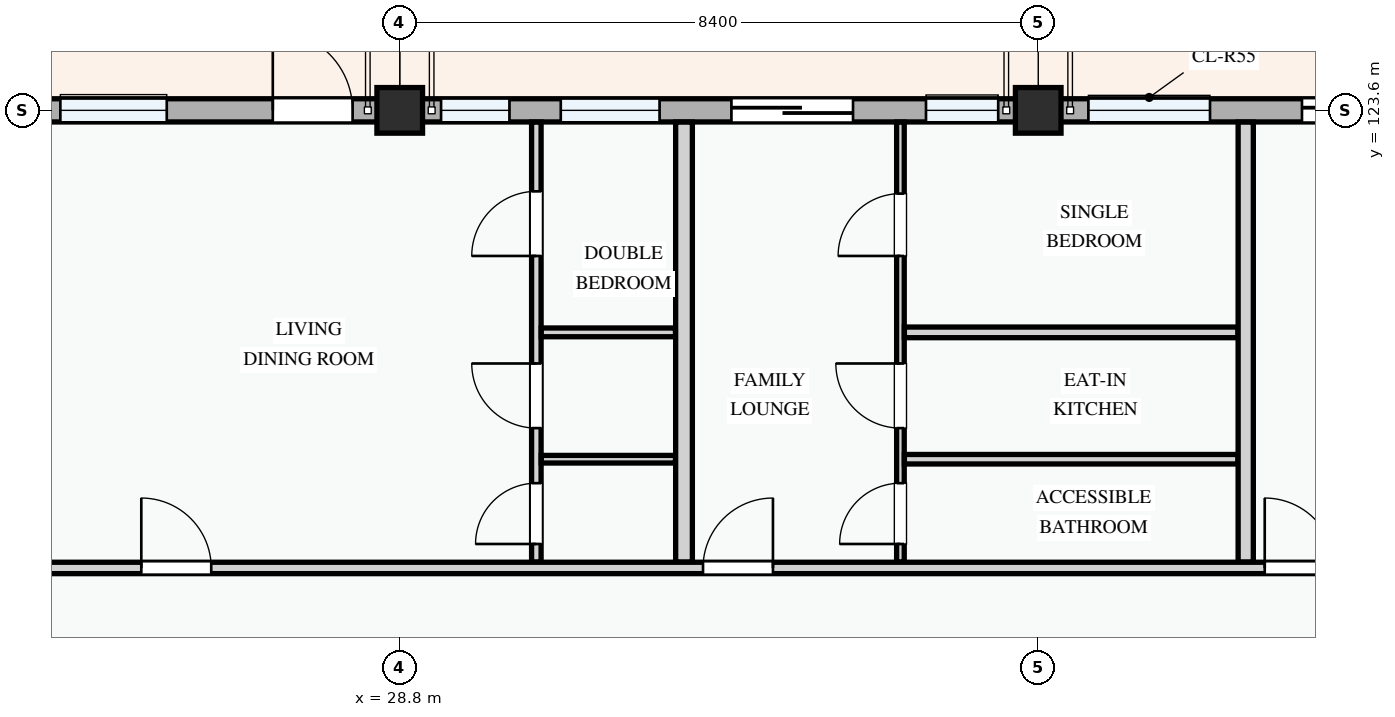
"""IFC4 building model, lengths in metres.
Left out: names, types, materials, properties, quantities, classifications, styles, units other than length and angle.
Written with IfcOpenShell. Run it as: python <this file> out.ifc"""

import sys

from ifc_helpers import new_model, si_unit, direction, frame, frame_2d, origin, origin_2d, place, context, subcontext, project, spatial, rectangle, extrude, element, fill, save


model = new_model("IFC4")
c1 = context("Model", 3, precision=1e-05, world=origin(), true_north=direction((0.0, 1.0)))
c2 = subcontext(c1, "Body", "Model", "MODEL_VIEW")
j1 = project(units=[si_unit("LENGTHUNIT", "METRE"), si_unit("PLANEANGLEUNIT", "RADIAN")], contexts=[c1])
p1 = place(None, origin())
s1 = spatial("IfcSite", under=j1, at=p1, CompositionType="ELEMENT")
p2 = place(p1, origin())
s2 = spatial("IfcBuilding", under=s1, at=p2, CompositionType="ELEMENT")
p3 = place(p2, frame((0.0, 0.0, 24.6)))
s3 = spatial("IfcBuildingStorey", under=s2, at=p3, CompositionType="ELEMENT", Elevation=24.6)
for number, where, z_axis, x_axis in (
    (1, (28.8, 123.6, 0.0), (0.0, 0.0, 1.0), (1.0, 0.0, 0.0)),
    (2, (37.2, 123.6, 0.0), (0.0, 0.0, 1.0), (1.0, 0.0, 0.0)),
):
    element("IfcColumn", number, at=place(p3, frame(where, z_axis=z_axis, x_axis=x_axis)), inside=s3, PredefinedType="COLUMN", context=c2, shape_type="SweptSolid", body=[
        extrude(rectangle(XDim=0.6, YDim=0.6, at=origin_2d()), origin(), (0.0, 0.0, 1.0), 3.3),
    ])
p4 = place(p3, frame((43.2, 123.6, 0.0), z_axis=(0.0, 0.0, 1.0), x_axis=(-1.0, 0.0, 0.0)))
e3 = element("IfcWall", 3, at=p4, inside=s3, PredefinedType="STANDARD", context=c2, shape_type="SweptSolid", body=[
    extrude(rectangle(XDim=6.0, YDim=0.305, at=frame_2d((3.0, 0.0))), origin(), (0.0, 0.0, 1.0), 2.475),
])
p5 = place(p4, frame((1.03, 0.0, 0.0)))
e4 = element("IfcOpeningElement", 4, at=p5, cuts=e3, PredefinedType="OPENING", context=c2, shape_type="SweptSolid", body=[
    extrude(rectangle(XDim=1.5, YDim=2.2, at=frame_2d((0.75, 1.1))), frame((0.0, 0.163, 0.0), z_axis=(0.0, -1.0, 0.0), x_axis=(1.0, 0.0, 0.0)), (0.0, 0.0, 1.0), 0.325),
])
p6 = place(p4, frame((3.74, 0.0, 0.78)))
e5 = element("IfcOpeningElement", 5, at=p6, cuts=e3, PredefinedType="OPENING", context=c2, shape_type="SweptSolid", body=[
    extrude(rectangle(XDim=1.6, YDim=1.55, at=frame_2d((0.8, 0.775))), frame((0.0, 0.163, 0.0), z_axis=(0.0, -1.0, 0.0), x_axis=(1.0, 0.0, 0.0)), (0.0, 0.0, 1.0), 0.325),
])
p7 = place(p3, frame((37.2, 123.6, 0.0), z_axis=(0.0, 0.0, 1.0), x_axis=(-1.0, 0.0, 0.0)))
e6 = element("IfcWall", 6, at=p7, inside=s3, PredefinedType="STANDARD", context=c2, shape_type="SweptSolid", body=[
    extrude(rectangle(XDim=8.4, YDim=0.305, at=frame_2d((4.2, 0.0))), origin(), (0.0, 0.0, 1.0), 2.375),
])
p8 = place(p7, frame((2.436, 0.0, 0.0)))
e7 = element("IfcOpeningElement", 7, at=p8, cuts=e6, PredefinedType="OPENING", context=c2, shape_type="SweptSolid", body=[
    extrude(rectangle(XDim=1.6, YDim=2.2, at=frame_2d((0.8, 1.1))), frame((0.0, 0.163, 0.0), z_axis=(0.0, -1.0, 0.0), x_axis=(1.0, 0.0, 0.0)), (0.0, 0.0, 1.0), 0.325),
])
p9 = place(p7, frame((0.526, 0.0, 0.78)))
e8 = element("IfcOpeningElement", 8, at=p9, cuts=e6, PredefinedType="OPENING", context=c2, shape_type="SweptSolid", body=[
    extrude(rectangle(XDim=0.95, YDim=1.15, at=frame_2d((0.475, 0.575))), frame((0.0, 0.163, 0.0), z_axis=(0.0, -1.0, 0.0), x_axis=(1.0, 0.0, 0.0)), (0.0, 0.0, 1.0), 0.325),
])
p10 = place(p7, frame((4.981, 0.0, 0.78)))
e9 = element("IfcOpeningElement", 9, at=p10, cuts=e6, PredefinedType="OPENING", context=c2, shape_type="SweptSolid", body=[
    extrude(rectangle(XDim=1.3, YDim=1.4, at=frame_2d((0.65, 0.7))), frame((0.0, 0.163, 0.0), z_axis=(0.0, -1.0, 0.0), x_axis=(1.0, 0.0, 0.0)), (0.0, 0.0, 1.0), 0.325),
])
p11 = place(p7, frame((6.956, 0.0, 0.78)))
e10 = element("IfcOpeningElement", 10, at=p11, cuts=e6, PredefinedType="OPENING", context=c2, shape_type="SweptSolid", body=[
    extrude(rectangle(XDim=0.9, YDim=1.2, at=frame_2d((0.45, 0.6))), frame((0.0, 0.163, 0.0), z_axis=(0.0, -1.0, 0.0), x_axis=(1.0, 0.0, 0.0)), (0.0, 0.0, 1.0), 0.325),
])
p12 = place(p3, frame((28.8, 123.6, 0.0), z_axis=(0.0, 0.0, 1.0), x_axis=(-1.0, 0.0, 0.0)))
e11 = element("IfcWall", 11, at=p12, inside=s3, PredefinedType="STANDARD", context=c2, shape_type="SweptSolid", body=[
    extrude(rectangle(XDim=6.0, YDim=0.305, at=frame_2d((3.0, 0.0))), origin(), (0.0, 0.0, 1.0), 2.475),
])
p13 = place(p12, frame((0.62, 0.0, 0.0)))
e12 = element("IfcOpeningElement", 12, at=p13, cuts=e11, PredefinedType="OPENING", context=c2, shape_type="SweptSolid", body=[
    extrude(rectangle(XDim=1.05, YDim=2.15, at=frame_2d((0.525, 1.075))), frame((0.0, 0.163, 0.0), z_axis=(0.0, -1.0, 0.0), x_axis=(1.0, 0.0, 0.0)), (0.0, 0.0, 1.0), 0.325),
])
p14 = place(p12, frame((3.065, 0.0, 0.78)))
e13 = element("IfcOpeningElement", 13, at=p14, cuts=e11, PredefinedType="OPENING", context=c2, shape_type="SweptSolid", body=[
    extrude(rectangle(XDim=1.4, YDim=1.45, at=frame_2d((0.7, 0.725))), frame((0.0, 0.163, 0.0), z_axis=(0.0, -1.0, 0.0), x_axis=(1.0, 0.0, 0.0)), (0.0, 0.0, 1.0), 0.325),
])
p15 = place(p3, frame((30.597, 117.657, 0.0), z_axis=(0.0, 0.0, 1.0), x_axis=(0.0, 1.0, 0.0)))
e14 = element("IfcWall", 14, at=p15, inside=s3, PredefinedType="PARTITIONING", context=c2, shape_type="SweptSolid", body=[
    extrude(rectangle(XDim=5.789, YDim=0.125, at=frame_2d((2.894, 0.0))), origin(), (0.0, 0.0, 1.0), 3.0),
])
p16 = place(p15, frame((0.238, 0.0, 0.0)))
e15 = element("IfcOpeningElement", 15, at=p16, cuts=e14, PredefinedType="OPENING", context=c2, shape_type="SweptSolid", body=[
    extrude(rectangle(XDim=0.8, YDim=2.1, at=frame_2d((0.4, 1.05))), frame((0.0, 0.073, 0.0), z_axis=(0.0, -1.0, 0.0), x_axis=(1.0, 0.0, 0.0)), (0.0, 0.0, 1.0), 0.145),
])
p17 = place(p15, frame((1.763, 0.0, 0.0)))
e16 = element("IfcOpeningElement", 16, at=p17, cuts=e14, PredefinedType="OPENING", context=c2, shape_type="SweptSolid", body=[
    extrude(rectangle(XDim=0.85, YDim=2.1, at=frame_2d((0.425, 1.05))), frame((0.0, 0.073, 0.0), z_axis=(0.0, -1.0, 0.0), x_axis=(1.0, 0.0, 0.0)), (0.0, 0.0, 1.0), 0.145),
])
p18 = place(p15, frame((4.028, 0.0, 0.0)))
e17 = element("IfcOpeningElement", 17, at=p18, cuts=e14, PredefinedType="OPENING", context=c2, shape_type="SweptSolid", body=[
    extrude(rectangle(XDim=0.85, YDim=2.1, at=frame_2d((0.425, 1.05))), frame((0.0, 0.073, 0.0), z_axis=(0.0, -1.0, 0.0), x_axis=(1.0, 0.0, 0.0)), (0.0, 0.0, 1.0), 0.145),
])
p19 = place(p3, frame((30.662, 120.679, 0.0), z_axis=(0.0, 0.0, 1.0), x_axis=(1.0, 0.0, 0.0)))
e18 = element("IfcWall", 18, at=p19, inside=s3, PredefinedType="PARTITIONING", context=c2, shape_type="SweptSolid", body=[
    extrude(rectangle(XDim=1.766, YDim=0.115, at=frame_2d((0.883, 0.0))), origin(), (0.0, 0.0, 1.0), 3.0),
])
p20 = place(p3, frame((30.662, 119.01, 0.0), z_axis=(0.0, 0.0, 1.0), x_axis=(1.0, 0.0, 0.0)))
e19 = element("IfcWall", 19, at=p20, inside=s3, PredefinedType="PARTITIONING", context=c2, shape_type="SweptSolid", body=[
    extrude(rectangle(XDim=1.766, YDim=0.1, at=frame_2d((0.883, 0.0))), origin(), (0.0, 0.0, 1.0), 3.0),
])
p21 = place(p3, frame((35.387, 117.657, 0.0), z_axis=(0.0, 0.0, 1.0), x_axis=(0.0, 1.0, 0.0)))
e20 = element("IfcWall", 20, at=p21, inside=s3, PredefinedType="PARTITIONING", context=c2, shape_type="SweptSolid", body=[
    extrude(rectangle(XDim=5.789, YDim=0.1, at=frame_2d((2.894, 0.0))), origin(), (0.0, 0.0, 1.0), 3.0),
])
p22 = place(p21, frame((0.238, 0.0, 0.0)))
e21 = element("IfcOpeningElement", 21, at=p22, cuts=e20, PredefinedType="OPENING", context=c2, shape_type="SweptSolid", body=[
    extrude(rectangle(XDim=0.8, YDim=2.1, at=frame_2d((0.4, 1.05))), frame((0.0, 0.06, 0.0), z_axis=(0.0, -1.0, 0.0), x_axis=(1.0, 0.0, 0.0)), (0.0, 0.0, 1.0), 0.12),
])
p23 = place(p21, frame((1.763, 0.0, 0.0)))
e22 = element("IfcOpeningElement", 22, at=p23, cuts=e20, PredefinedType="OPENING", context=c2, shape_type="SweptSolid", body=[
    extrude(rectangle(XDim=0.85, YDim=2.1, at=frame_2d((0.425, 1.05))), frame((0.0, 0.06, 0.0), z_axis=(0.0, -1.0, 0.0), x_axis=(1.0, 0.0, 0.0)), (0.0, 0.0, 1.0), 0.12),
])
p24 = place(p21, frame((4.028, 0.0, 0.0)))
e23 = element("IfcOpeningElement", 23, at=p24, cuts=e20, PredefinedType="OPENING", context=c2, shape_type="SweptSolid", body=[
    extrude(rectangle(XDim=0.82, YDim=2.08, at=frame_2d((0.41, 1.04))), frame((0.0, 0.06, 0.0), z_axis=(0.0, -1.0, 0.0), x_axis=(1.0, 0.0, 0.0)), (0.0, 0.0, 1.0), 0.12),
])
p25 = place(p3, frame((35.439, 120.679, 0.0), z_axis=(0.0, 0.0, 1.0), x_axis=(1.0, 0.0, 0.0)))
e24 = element("IfcWall", 24, at=p25, inside=s3, PredefinedType="PARTITIONING", context=c2, shape_type="SweptSolid", body=[
    extrude(rectangle(XDim=4.389, YDim=0.14, at=frame_2d((2.194, 0.0))), origin(), (0.0, 0.0, 1.0), 3.0),
])
p26 = place(p3, frame((35.439, 119.01, 0.0), z_axis=(0.0, 0.0, 1.0), x_axis=(1.0, 0.0, 0.0)))
e25 = element("IfcWall", 25, at=p26, inside=s3, PredefinedType="PARTITIONING", context=c2, shape_type="SweptSolid", body=[
    extrude(rectangle(XDim=4.389, YDim=0.125, at=frame_2d((2.194, 0.0))), origin(), (0.0, 0.0, 1.0), 3.0),
])
p27 = place(p3, frame((32.54, 117.657, 0.0), z_axis=(0.0, 0.0, 1.0), x_axis=(0.0, 1.0, 0.0)))
e26 = element("IfcWall", 26, at=p27, inside=s3, PredefinedType="PARTITIONING", context=c2, shape_type="SweptSolid", body=[
    extrude(rectangle(XDim=5.789, YDim=0.22, at=frame_2d((2.894, 0.0))), origin(), (0.0, 0.0, 1.0), 3.0),
])
p28 = place(p3, frame((39.93, 117.657, 0.0), z_axis=(0.0, 0.0, 1.0), x_axis=(0.0, 1.0, 0.0)))
e27 = element("IfcWall", 27, at=p28, inside=s3, PredefinedType="PARTITIONING", context=c2, shape_type="SweptSolid", body=[
    extrude(rectangle(XDim=5.789, YDim=0.2, at=frame_2d((2.894, 0.0))), origin(), (0.0, 0.0, 1.0), 3.0),
])
p29 = place(p3, frame((22.66, 117.58, 0.0), z_axis=(0.0, 0.0, 1.0), x_axis=(1.0, 0.0, 0.0)))
e28 = element("IfcWall", 28, at=p29, inside=s3, PredefinedType="PARTITIONING", context=c2, shape_type="SweptSolid", body=[
    extrude(rectangle(XDim=28.88, YDim=0.15, at=frame_2d((14.44, 0.0))), origin(), (0.0, 0.0, 1.0), 3.0),
])
p30 = place(p29, frame((2.74, 0.0, 0.0)))
e29 = element("IfcOpeningElement", 29, at=p30, cuts=e28, PredefinedType="OPENING", context=c2, shape_type="SweptSolid", body=[
    extrude(rectangle(XDim=0.92, YDim=2.1, at=frame_2d((0.46, 1.05))), frame((0.0, 0.085, 0.0), z_axis=(0.0, -1.0, 0.0), x_axis=(1.0, 0.0, 0.0)), (0.0, 0.0, 1.0), 0.17),
])
p31 = place(p29, frame((10.13, 0.0, 0.0)))
e30 = element("IfcOpeningElement", 30, at=p31, cuts=e28, PredefinedType="OPENING", context=c2, shape_type="SweptSolid", body=[
    extrude(rectangle(XDim=0.92, YDim=2.1, at=frame_2d((0.46, 1.05))), frame((0.0, 0.085, 0.0), z_axis=(0.0, -1.0, 0.0), x_axis=(1.0, 0.0, 0.0)), (0.0, 0.0, 1.0), 0.17),
])
p32 = place(p29, frame((17.52, 0.0, 0.0)))
e31 = element("IfcOpeningElement", 31, at=p32, cuts=e28, PredefinedType="OPENING", context=c2, shape_type="SweptSolid", body=[
    extrude(rectangle(XDim=0.92, YDim=2.1, at=frame_2d((0.46, 1.05))), frame((0.0, 0.085, 0.0), z_axis=(0.0, -1.0, 0.0), x_axis=(1.0, 0.0, 0.0)), (0.0, 0.0, 1.0), 0.17),
])
p33 = place(p5, frame((1.5, 0.0, 0.0), z_axis=(0.0, 0.0, 1.0), x_axis=(-1.0, 0.0, 0.0)))
e32 = element("IfcDoor", 32, at=p33, inside=s3, OperationType="SLIDING_TO_RIGHT", PredefinedType="DOOR", context=c2, shape_type="SweptSolid", body=[
    extrude(rectangle(XDim=1.5, YDim=2.2, at=frame_2d((0.75, 1.1))), frame((0.0, 0.025, 0.0), z_axis=(0.0, -1.0, 0.0), x_axis=(1.0, 0.0, 0.0)), (0.0, 0.0, 1.0), 0.05),
])
fill(e4, e32)
p34 = place(p6, origin())
e33 = element("IfcWindow", 33, at=p34, inside=s3, PartitioningType="DOUBLE_PANEL_VERTICAL", PredefinedType="WINDOW", context=c2, shape_type="SweptSolid", body=[
    extrude(rectangle(XDim=1.6, YDim=1.55, at=frame_2d((0.8, 0.775))), frame((0.0, 0.03, 0.0), z_axis=(0.0, -1.0, 0.0), x_axis=(1.0, 0.0, 0.0)), (0.0, 0.0, 1.0), 0.06),
])
fill(e5, e33)
p35 = place(p8, frame((1.6, 0.0, 0.0), z_axis=(0.0, 0.0, 1.0), x_axis=(-1.0, 0.0, 0.0)))
e34 = element("IfcDoor", 34, at=p35, inside=s3, OperationType="SLIDING_TO_LEFT", PredefinedType="DOOR", context=c2, shape_type="SweptSolid", body=[
    extrude(rectangle(XDim=1.6, YDim=2.2, at=frame_2d((0.8, 1.1))), frame((0.0, 0.025, 0.0), z_axis=(0.0, -1.0, 0.0), x_axis=(1.0, 0.0, 0.0)), (0.0, 0.0, 1.0), 0.05),
])
fill(e7, e34)
p36 = place(p9, origin())
e35 = element("IfcWindow", 35, at=p36, inside=s3, PartitioningType="SINGLE_PANEL", PredefinedType="WINDOW", context=c2, shape_type="SweptSolid", body=[
    extrude(rectangle(XDim=0.95, YDim=1.15, at=frame_2d((0.475, 0.575))), frame((0.0, 0.03, 0.0), z_axis=(0.0, -1.0, 0.0), x_axis=(1.0, 0.0, 0.0)), (0.0, 0.0, 1.0), 0.06),
])
fill(e8, e35)
p37 = place(p10, origin())
e36 = element("IfcWindow", 36, at=p37, inside=s3, PartitioningType="SINGLE_PANEL", PredefinedType="WINDOW", context=c2, shape_type="SweptSolid", body=[
    extrude(rectangle(XDim=1.3, YDim=1.4, at=frame_2d((0.65, 0.7))), frame((0.0, 0.03, 0.0), z_axis=(0.0, -1.0, 0.0), x_axis=(1.0, 0.0, 0.0)), (0.0, 0.0, 1.0), 0.06),
])
fill(e9, e36)
p38 = place(p11, origin())
e37 = element("IfcWindow", 37, at=p38, inside=s3, PartitioningType="SINGLE_PANEL", PredefinedType="WINDOW", context=c2, shape_type="SweptSolid", body=[
    extrude(rectangle(XDim=0.9, YDim=1.2, at=frame_2d((0.45, 0.6))), frame((0.0, 0.03, 0.0), z_axis=(0.0, -1.0, 0.0), x_axis=(1.0, 0.0, 0.0)), (0.0, 0.0, 1.0), 0.06),
])
fill(e10, e37)
p39 = place(p13, frame((1.05, 0.0, 0.0), z_axis=(0.0, 0.0, 1.0), x_axis=(-1.0, 0.0, 0.0)))
e38 = element("IfcDoor", 38, at=p39, inside=s3, OperationType="SINGLE_SWING_LEFT", PredefinedType="DOOR", context=c2, shape_type="SweptSolid", body=[
    extrude(rectangle(XDim=1.05, YDim=2.15, at=frame_2d((0.525, 1.075))), frame((0.0, 0.025, 0.0), z_axis=(0.0, -1.0, 0.0), x_axis=(1.0, 0.0, 0.0)), (0.0, 0.0, 1.0), 0.05),
])
fill(e12, e38)
p40 = place(p14, origin())
e39 = element("IfcWindow", 39, at=p40, inside=s3, PartitioningType="SINGLE_PANEL", PredefinedType="WINDOW", context=c2, shape_type="SweptSolid", body=[
    extrude(rectangle(XDim=1.4, YDim=1.45, at=frame_2d((0.7, 0.725))), frame((0.0, 0.03, 0.0), z_axis=(0.0, -1.0, 0.0), x_axis=(1.0, 0.0, 0.0)), (0.0, 0.0, 1.0), 0.06),
])
fill(e13, e39)
p41 = place(p16, origin())
e40 = element("IfcDoor", 40, at=p41, inside=s3, OperationType="SINGLE_SWING_LEFT", PredefinedType="DOOR", context=c2, shape_type="SweptSolid", body=[
    extrude(rectangle(XDim=0.8, YDim=2.1, at=frame_2d((0.4, 1.05))), frame((0.0, 0.025, 0.0), z_axis=(0.0, -1.0, 0.0), x_axis=(1.0, 0.0, 0.0)), (0.0, 0.0, 1.0), 0.05),
])
fill(e15, e40)
p42 = place(p17, origin())
e41 = element("IfcDoor", 41, at=p42, inside=s3, OperationType="SINGLE_SWING_RIGHT", PredefinedType="DOOR", context=c2, shape_type="SweptSolid", body=[
    extrude(rectangle(XDim=0.85, YDim=2.1, at=frame_2d((0.425, 1.05))), frame((0.0, 0.025, 0.0), z_axis=(0.0, -1.0, 0.0), x_axis=(1.0, 0.0, 0.0)), (0.0, 0.0, 1.0), 0.05),
])
fill(e16, e41)
p43 = place(p18, origin())
e42 = element("IfcDoor", 42, at=p43, inside=s3, OperationType="SINGLE_SWING_LEFT", PredefinedType="DOOR", context=c2, shape_type="SweptSolid", body=[
    extrude(rectangle(XDim=0.85, YDim=2.1, at=frame_2d((0.425, 1.05))), frame((0.0, 0.025, 0.0), z_axis=(0.0, -1.0, 0.0), x_axis=(1.0, 0.0, 0.0)), (0.0, 0.0, 1.0), 0.05),
])
fill(e17, e42)
p44 = place(p22, origin())
e43 = element("IfcDoor", 43, at=p44, inside=s3, OperationType="SINGLE_SWING_LEFT", PredefinedType="DOOR", context=c2, shape_type="SweptSolid", body=[
    extrude(rectangle(XDim=0.8, YDim=2.1, at=frame_2d((0.4, 1.05))), frame((0.0, 0.025, 0.0), z_axis=(0.0, -1.0, 0.0), x_axis=(1.0, 0.0, 0.0)), (0.0, 0.0, 1.0), 0.05),
])
fill(e21, e43)
p45 = place(p23, origin())
e44 = element("IfcDoor", 44, at=p45, inside=s3, OperationType="SINGLE_SWING_RIGHT", PredefinedType="DOOR", context=c2, shape_type="SweptSolid", body=[
    extrude(rectangle(XDim=0.85, YDim=2.1, at=frame_2d((0.425, 1.05))), frame((0.0, 0.025, 0.0), z_axis=(0.0, -1.0, 0.0), x_axis=(1.0, 0.0, 0.0)), (0.0, 0.0, 1.0), 0.05),
])
fill(e22, e44)
p46 = place(p24, origin())
e45 = element("IfcDoor", 45, at=p46, inside=s3, OperationType="SINGLE_SWING_LEFT", PredefinedType="DOOR", context=c2, shape_type="SweptSolid", body=[
    extrude(rectangle(XDim=0.82, YDim=2.08, at=frame_2d((0.41, 1.04))), frame((0.0, 0.025, 0.0), z_axis=(0.0, -1.0, 0.0), x_axis=(1.0, 0.0, 0.0)), (0.0, 0.0, 1.0), 0.05),
])
fill(e23, e45)
p47 = place(p30, origin())
e46 = element("IfcDoor", 46, at=p47, inside=s3, OperationType="SINGLE_SWING_LEFT", PredefinedType="DOOR", context=c2, shape_type="SweptSolid", body=[
    extrude(rectangle(XDim=0.92, YDim=2.1, at=frame_2d((0.46, 1.05))), frame((0.0, 0.025, 0.0), z_axis=(0.0, -1.0, 0.0), x_axis=(1.0, 0.0, 0.0)), (0.0, 0.0, 1.0), 0.05),
])
fill(e29, e46)
p48 = place(p31, origin())
e47 = element("IfcDoor", 47, at=p48, inside=s3, OperationType="SINGLE_SWING_RIGHT", PredefinedType="DOOR", context=c2, shape_type="SweptSolid", body=[
    extrude(rectangle(XDim=0.92, YDim=2.1, at=frame_2d((0.46, 1.05))), frame((0.0, 0.025, 0.0), z_axis=(0.0, -1.0, 0.0), x_axis=(1.0, 0.0, 0.0)), (0.0, 0.0, 1.0), 0.05),
])
fill(e30, e47)
p49 = place(p32, origin())
e48 = element("IfcDoor", 48, at=p49, inside=s3, OperationType="SINGLE_SWING_LEFT", PredefinedType="DOOR", context=c2, shape_type="SweptSolid", body=[
    extrude(rectangle(XDim=0.92, YDim=2.1, at=frame_2d((0.46, 1.05))), frame((0.0, 0.025, 0.0), z_axis=(0.0, -1.0, 0.0), x_axis=(1.0, 0.0, 0.0)), (0.0, 0.0, 1.0), 0.05),
])
fill(e31, e48)
save(model, sys.argv[1])
